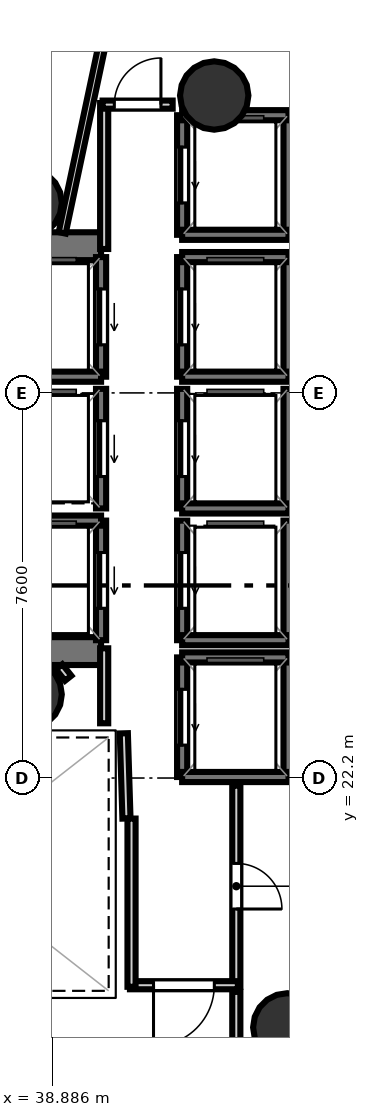
"""IFC4 building model, lengths in metres.
Left out: names, types, materials, properties, quantities, classifications, styles, units other than length and angle.
Written with IfcOpenShell. Run it as: python <this file> out.ifc"""

import sys

from ifc_helpers import new_model, si_unit, direction, frame, frame_2d, origin, origin_2d, place, context, subcontext, project, spatial, rectangle, hollow_circle, extrude, element, fill, save


model = new_model("IFC4")
c1 = context("Model", 3, precision=1e-05, world=origin(), true_north=direction((0.0, 1.0)))
c2 = subcontext(c1, "Body", "Model", "MODEL_VIEW")
j1 = project(units=[si_unit("LENGTHUNIT", "METRE"), si_unit("PLANEANGLEUNIT", "RADIAN")], contexts=[c1])
p1 = place(None, origin())
s1 = spatial("IfcSite", under=j1, at=p1, CompositionType="ELEMENT")
p2 = place(p1, origin())
s2 = spatial("IfcBuilding", under=s1, at=p2, CompositionType="ELEMENT")
p3 = place(p2, frame((0.0, 0.0, 143.1)))
s3 = spatial("IfcBuildingStorey", under=s2, at=p3, CompositionType="ELEMENT", Elevation=143.1)
p4 = place(p3, frame((29.23, 32.695, 0.0), z_axis=(0.0, 0.0, 1.0), x_axis=(1.0, 0.0, 0.0)))
e1 = element("IfcWall", 1, at=p4, inside=s3, PredefinedType="SHEAR", context=c2, shape_type="SweptSolid", body=[
    extrude(rectangle(XDim=10.62, YDim=0.55, at=frame_2d((5.31, 0.0))), origin(), (0.0, 0.0, 1.0), 4.32),
])
p5 = place(p4, frame((0.995, 0.0, 0.0)))
e2 = element("IfcOpeningElement", 2, at=p5, cuts=e1, PredefinedType="OPENING", context=c2, shape_type="SweptSolid", body=[
    extrude(rectangle(XDim=1.25, YDim=2.15, at=frame_2d((0.625, 1.075))), frame((0.0, 0.285, 0.0), z_axis=(0.0, -1.0, 0.0), x_axis=(1.0, 0.0, 0.0)), (0.0, 0.0, 1.0), 0.57),
])
p6 = place(p3, frame((29.23, 24.705, 0.0), z_axis=(0.0, 0.0, 1.0), x_axis=(1.0, 0.0, 0.0)))
e3 = element("IfcWall", 3, at=p6, inside=s3, PredefinedType="SHEAR", context=c2, shape_type="SweptSolid", body=[
    extrude(rectangle(XDim=10.62, YDim=0.55, at=frame_2d((5.31, 0.0))), origin(), (0.0, 0.0, 1.0), 4.32),
])
p7 = place(p6, frame((0.795, 0.0, 0.0)))
e4 = element("IfcOpeningElement", 4, at=p7, cuts=e3, PredefinedType="OPENING", context=c2, shape_type="SweptSolid", body=[
    extrude(rectangle(XDim=1.25, YDim=2.15, at=frame_2d((0.625, 1.075))), frame((0.0, 0.285, 0.0), z_axis=(0.0, -1.0, 0.0), x_axis=(1.0, 0.0, 0.0)), (0.0, 0.0, 1.0), 0.57),
])
for number, where, z_axis, x_axis in (
    (5, (38.4, 33.55, 0.0), (0.0, 0.0, 1.0), (1.0, 0.0, 0.0)),
    (6, (38.4, 23.85, 0.0), (0.0, 0.0, 1.0), (1.0, 0.0, 0.0)),
):
    element("IfcColumn", number, at=place(p3, frame(where, z_axis=z_axis, x_axis=x_axis)), inside=s3, PredefinedType="COLUMN", context=c2, shape_type="SweptSolid", body=[
        extrude(hollow_circle(Radius=0.675, WallThickness=0.032, at=origin_2d()), origin(), (0.0, 0.0, 1.0), 4.5),
    ])
for number, where, z_axis, x_axis in (
    (7, (42.083, 35.669, -0.27), (0.0, 0.0, 1.0), (1.0, 0.0, 0.0)),
    (8, (43.525, 17.279, -0.27), (0.0, 0.0, 1.0), (1.0, 0.0, 0.0)),
):
    element("IfcColumn", number, at=place(p3, frame(where, z_axis=z_axis, x_axis=x_axis)), inside=s3, PredefinedType="COLUMN", context=c2, shape_type="SweptSolid", body=[
        extrude(hollow_circle(Radius=0.675, WallThickness=0.032, at=origin_2d()), origin(), (0.0, 0.0, 1.0), 4.77),
    ])
p8 = place(p3, frame((39.85, 30.12, 0.0), z_axis=(0.0, 0.0, 1.0), x_axis=(0.0, 1.0, 0.0)))
e9 = element("IfcWall", 9, at=p8, inside=s3, PredefinedType="SOLIDWALL", context=c2, shape_type="SweptSolid", body=[
    extrude(rectangle(XDim=2.36, YDim=0.2, at=frame_2d((1.18, 0.0))), origin(), (0.0, 0.0, 1.0), 4.32),
])
p9 = place(p8, frame((0.63, 0.0, 0.0)))
e10 = element("IfcOpeningElement", 10, at=p9, cuts=e9, PredefinedType="OPENING", context=c2, shape_type="SweptSolid", body=[
    extrude(rectangle(XDim=1.1, YDim=2.15, at=frame_2d((0.55, 1.075))), frame((0.0, 0.11, 0.0), z_axis=(0.0, -1.0, 0.0), x_axis=(1.0, 0.0, 0.0)), (0.0, 0.0, 1.0), 0.22),
])
p10 = place(p3, frame((37.75, 30.12, 0.0), z_axis=(0.0, 0.0, 1.0), x_axis=(1.0, 0.0, 0.0)))
e11 = element("IfcWall", 11, at=p10, inside=s3, PredefinedType="SOLIDWALL", context=c2, shape_type="SweptSolid", body=[
    extrude(rectangle(XDim=2.1, YDim=0.2, at=frame_2d((1.05, 0.0))), origin(), (0.0, 0.0, 1.0), 4.32),
])
p11 = place(p3, frame((39.85, 24.92, 0.0), z_axis=(0.0, 0.0, 1.0), x_axis=(0.0, 1.0, 0.0)))
e12 = element("IfcWall", 12, at=p11, inside=s3, PredefinedType="SOLIDWALL", context=c2, shape_type="SweptSolid", body=[
    extrude(rectangle(XDim=2.36, YDim=0.2, at=frame_2d((1.18, 0.0))), origin(), (0.0, 0.0, 1.0), 4.32),
])
p12 = place(p11, frame((0.63, 0.0, 0.0)))
e13 = element("IfcOpeningElement", 13, at=p12, cuts=e12, PredefinedType="OPENING", context=c2, shape_type="SweptSolid", body=[
    extrude(rectangle(XDim=1.1, YDim=2.15, at=frame_2d((0.55, 1.075))), frame((0.0, 0.11, 0.0), z_axis=(0.0, -1.0, 0.0), x_axis=(1.0, 0.0, 0.0)), (0.0, 0.0, 1.0), 0.22),
])
p13 = place(p3, frame((37.75, 27.28, 0.0), z_axis=(0.0, 0.0, 1.0), x_axis=(1.0, 0.0, 0.0)))
e14 = element("IfcWall", 14, at=p13, inside=s3, PredefinedType="SOLIDWALL", context=c2, shape_type="SweptSolid", body=[
    extrude(rectangle(XDim=2.1, YDim=0.2, at=frame_2d((1.05, 0.0))), origin(), (0.0, 0.0, 1.0), 4.32),
])
p14 = place(p3, frame((43.55, 30.12, 0.0), z_axis=(0.0, 0.0, 1.0), x_axis=(0.0, 1.0, 0.0)))
e15 = element("IfcWall", 15, at=p14, inside=s3, PredefinedType="SOLIDWALL", context=c2, shape_type="SweptSolid", body=[
    extrude(rectangle(XDim=2.36, YDim=0.2, at=frame_2d((1.18, 0.0))), origin(), (0.0, 0.0, 1.0), 4.32),
])
p15 = place(p3, frame((41.45, 30.12, 0.0), z_axis=(0.0, 0.0, 1.0), x_axis=(0.0, 1.0, 0.0)))
e16 = element("IfcWall", 16, at=p15, inside=s3, PredefinedType="SOLIDWALL", context=c2, shape_type="SweptSolid", body=[
    extrude(rectangle(XDim=2.36, YDim=0.2, at=frame_2d((1.18, 0.0))), origin(), (0.0, 0.0, 1.0), 4.32),
])
p16 = place(p15, frame((0.63, 0.0, 0.0)))
e17 = element("IfcOpeningElement", 17, at=p16, cuts=e16, PredefinedType="OPENING", context=c2, shape_type="SweptSolid", body=[
    extrude(rectangle(XDim=1.1, YDim=2.15, at=frame_2d((0.55, 1.075))), frame((0.0, 0.11, 0.0), z_axis=(0.0, -1.0, 0.0), x_axis=(1.0, 0.0, 0.0)), (0.0, 0.0, 1.0), 0.22),
])
for number, where, z_axis, x_axis in (
    (18, (41.45, 32.48, 0.0), (0.0, 0.0, 1.0), (1.0, 0.0, 0.0)),
    (19, (41.45, 30.12, 0.0), (0.0, 0.0, 1.0), (1.0, 0.0, 0.0)),
):
    element("IfcWall", number, at=place(p3, frame(where, z_axis=z_axis, x_axis=x_axis)), inside=s3, PredefinedType="SOLIDWALL", context=c2, shape_type="SweptSolid", body=[
        extrude(rectangle(XDim=2.1, YDim=0.2, at=frame_2d((1.05, 0.0))), origin(), (0.0, 0.0, 1.0), 4.32),
    ])
p17 = place(p3, frame((43.55, 27.52, 0.0), z_axis=(0.0, 0.0, 1.0), x_axis=(0.0, 1.0, 0.0)))
e20 = element("IfcWall", 20, at=p17, inside=s3, PredefinedType="SOLIDWALL", context=c2, shape_type="SweptSolid", body=[
    extrude(rectangle(XDim=2.36, YDim=0.2, at=frame_2d((1.18, 0.0))), origin(), (0.0, 0.0, 1.0), 4.32),
])
p18 = place(p3, frame((41.45, 27.52, 0.0), z_axis=(0.0, 0.0, 1.0), x_axis=(0.0, 1.0, 0.0)))
e21 = element("IfcWall", 21, at=p18, inside=s3, PredefinedType="SOLIDWALL", context=c2, shape_type="SweptSolid", body=[
    extrude(rectangle(XDim=2.36, YDim=0.2, at=frame_2d((1.18, 0.0))), origin(), (0.0, 0.0, 1.0), 4.32),
])
p19 = place(p18, frame((0.63, 0.0, 0.0)))
e22 = element("IfcOpeningElement", 22, at=p19, cuts=e21, PredefinedType="OPENING", context=c2, shape_type="SweptSolid", body=[
    extrude(rectangle(XDim=1.1, YDim=2.15, at=frame_2d((0.55, 1.075))), frame((0.0, 0.11, 0.0), z_axis=(0.0, -1.0, 0.0), x_axis=(1.0, 0.0, 0.0)), (0.0, 0.0, 1.0), 0.22),
])
p20 = place(p3, frame((41.45, 27.52, 0.0), z_axis=(0.0, 0.0, 1.0), x_axis=(1.0, 0.0, 0.0)))
e23 = element("IfcWall", 23, at=p20, inside=s3, PredefinedType="SOLIDWALL", context=c2, shape_type="SweptSolid", body=[
    extrude(rectangle(XDim=2.1, YDim=0.2, at=frame_2d((1.05, 0.0))), origin(), (0.0, 0.0, 1.0), 4.32),
])
p21 = place(p3, frame((43.55, 24.92, 0.0), z_axis=(0.0, 0.0, 1.0), x_axis=(0.0, 1.0, 0.0)))
e24 = element("IfcWall", 24, at=p21, inside=s3, PredefinedType="SOLIDWALL", context=c2, shape_type="SweptSolid", body=[
    extrude(rectangle(XDim=2.36, YDim=0.2, at=frame_2d((1.18, 0.0))), origin(), (0.0, 0.0, 1.0), 4.32),
])
p22 = place(p3, frame((41.45, 24.92, 0.0), z_axis=(0.0, 0.0, 1.0), x_axis=(0.0, 1.0, 0.0)))
e25 = element("IfcWall", 25, at=p22, inside=s3, PredefinedType="SOLIDWALL", context=c2, shape_type="SweptSolid", body=[
    extrude(rectangle(XDim=2.36, YDim=0.2, at=frame_2d((1.18, 0.0))), origin(), (0.0, 0.0, 1.0), 4.32),
])
p23 = place(p22, frame((0.63, 0.0, 0.0)))
e26 = element("IfcOpeningElement", 26, at=p23, cuts=e25, PredefinedType="OPENING", context=c2, shape_type="SweptSolid", body=[
    extrude(rectangle(XDim=1.1, YDim=2.15, at=frame_2d((0.55, 1.075))), frame((0.0, 0.11, 0.0), z_axis=(0.0, -1.0, 0.0), x_axis=(1.0, 0.0, 0.0)), (0.0, 0.0, 1.0), 0.22),
])
p24 = place(p3, frame((41.45, 24.92, 0.0), z_axis=(0.0, 0.0, 1.0), x_axis=(1.0, 0.0, 0.0)))
e27 = element("IfcWall", 27, at=p24, inside=s3, PredefinedType="SOLIDWALL", context=c2, shape_type="SweptSolid", body=[
    extrude(rectangle(XDim=2.1, YDim=0.2, at=frame_2d((1.05, 0.0))), origin(), (0.0, 0.0, 1.0), 4.32),
])
p25 = place(p3, frame((39.85, 27.52, 0.0), z_axis=(0.0, 0.0, 1.0), x_axis=(0.0, 1.0, 0.0)))
e28 = element("IfcWall", 28, at=p25, inside=s3, PredefinedType="SOLIDWALL", context=c2, shape_type="SweptSolid", body=[
    extrude(rectangle(XDim=2.36, YDim=0.2, at=frame_2d((1.18, 0.0))), origin(), (0.0, 0.0, 1.0), 4.32),
])
p26 = place(p25, frame((0.63, 0.0, 0.0)))
e29 = element("IfcOpeningElement", 29, at=p26, cuts=e28, PredefinedType="OPENING", context=c2, shape_type="SweptSolid", body=[
    extrude(rectangle(XDim=1.1, YDim=2.15, at=frame_2d((0.55, 1.075))), frame((0.0, 0.11, 0.0), z_axis=(0.0, -1.0, 0.0), x_axis=(1.0, 0.0, 0.0)), (0.0, 0.0, 1.0), 0.22),
])
p27 = place(p3, frame((43.55, 22.22, 0.0), z_axis=(0.0, 0.0, 1.0), x_axis=(0.0, 1.0, 0.0)))
e30 = element("IfcWall", 30, at=p27, inside=s3, PredefinedType="SOLIDWALL", context=c2, shape_type="SweptSolid", body=[
    extrude(rectangle(XDim=2.36, YDim=0.2, at=frame_2d((1.18, 0.0))), origin(), (0.0, 0.0, 1.0), 4.32),
])
p28 = place(p3, frame((41.45, 22.22, 0.0), z_axis=(0.0, 0.0, 1.0), x_axis=(0.0, 1.0, 0.0)))
e31 = element("IfcWall", 31, at=p28, inside=s3, PredefinedType="SOLIDWALL", context=c2, shape_type="SweptSolid", body=[
    extrude(rectangle(XDim=2.36, YDim=0.2, at=frame_2d((1.18, 0.0))), origin(), (0.0, 0.0, 1.0), 4.32),
])
p29 = place(p28, frame((0.63, 0.0, 0.0)))
e32 = element("IfcOpeningElement", 32, at=p29, cuts=e31, PredefinedType="OPENING", context=c2, shape_type="SweptSolid", body=[
    extrude(rectangle(XDim=1.1, YDim=2.15, at=frame_2d((0.55, 1.075))), frame((0.0, 0.11, 0.0), z_axis=(0.0, -1.0, 0.0), x_axis=(1.0, 0.0, 0.0)), (0.0, 0.0, 1.0), 0.22),
])
for number, where, z_axis, x_axis in (
    (33, (41.45, 24.58, 0.0), (0.0, 0.0, 1.0), (1.0, 0.0, 0.0)),
    (34, (41.45, 22.22, 0.0), (0.0, 0.0, 1.0), (1.0, 0.0, 0.0)),
):
    element("IfcWall", number, at=place(p3, frame(where, z_axis=z_axis, x_axis=x_axis)), inside=s3, PredefinedType="SOLIDWALL", context=c2, shape_type="SweptSolid", body=[
        extrude(rectangle(XDim=2.1, YDim=0.2, at=frame_2d((1.05, 0.0))), origin(), (0.0, 0.0, 1.0), 4.32),
    ])
p30 = place(p3, frame((43.55, 32.92, 0.0), z_axis=(0.0, 0.0, 1.0), x_axis=(0.0, 1.0, 0.0)))
e35 = element("IfcWall", 35, at=p30, inside=s3, PredefinedType="SOLIDWALL", context=c2, shape_type="SweptSolid", body=[
    extrude(rectangle(XDim=2.36, YDim=0.2, at=frame_2d((1.18, 0.0))), origin(), (0.0, 0.0, 1.0), 4.32),
])
p31 = place(p3, frame((41.45, 32.92, 0.0), z_axis=(0.0, 0.0, 1.0), x_axis=(0.0, 1.0, 0.0)))
e36 = element("IfcWall", 36, at=p31, inside=s3, PredefinedType="SOLIDWALL", context=c2, shape_type="SweptSolid", body=[
    extrude(rectangle(XDim=2.36, YDim=0.2, at=frame_2d((1.18, 0.0))), origin(), (0.0, 0.0, 1.0), 4.32),
])
p32 = place(p31, frame((0.63, 0.0, 0.0)))
e37 = element("IfcOpeningElement", 37, at=p32, cuts=e36, PredefinedType="OPENING", context=c2, shape_type="SweptSolid", body=[
    extrude(rectangle(XDim=1.1, YDim=2.15, at=frame_2d((0.55, 1.075))), frame((0.0, 0.11, 0.0), z_axis=(0.0, -1.0, 0.0), x_axis=(1.0, 0.0, 0.0)), (0.0, 0.0, 1.0), 0.22),
])
for number, where, z_axis, x_axis in (
    (38, (41.45, 35.28, 0.0), (0.0, 0.0, 1.0), (1.0, 0.0, 0.0)),
    (39, (41.45, 32.92, 0.0), (0.0, 0.0, 1.0), (1.0, 0.0, 0.0)),
):
    element("IfcWall", number, at=place(p3, frame(where, z_axis=z_axis, x_axis=x_axis)), inside=s3, PredefinedType="SOLIDWALL", context=c2, shape_type="SweptSolid", body=[
        extrude(rectangle(XDim=2.1, YDim=0.2, at=frame_2d((1.05, 0.0))), origin(), (0.0, 0.0, 1.0), 4.32),
    ])
p33 = place(p3, frame((40.351, 21.401, 0.0), z_axis=(0.0, 0.0, 1.0), x_axis=(-0.031058045979, 0.999517582527, 0.0)))
e40 = element("IfcWall", 40, at=p33, inside=s3, PredefinedType="PARTITIONING", context=c2, shape_type="SweptSolid", body=[
    extrude(rectangle(XDim=1.682, YDim=0.16, at=frame_2d((0.841, 0.0))), origin(), (0.0, 0.0, 1.0), 3.64),
])
p34 = place(p3, frame((39.911, 23.28, 0.0), z_axis=(0.0, 0.0, 1.0), x_axis=(0.0, 1.0, 0.0)))
e41 = element("IfcWall", 41, at=p34, inside=s3, PredefinedType="PARTITIONING", context=c2, shape_type="SweptSolid", body=[
    extrude(rectangle(XDim=1.48, YDim=0.16, at=frame_2d((0.74, 0.0))), origin(), (0.0, 0.0, 1.0), 3.64),
])
p35 = place(p3, frame((39.911, 32.64, 0.0), z_axis=(0.0, 0.0, 1.0), x_axis=(0.0, 1.0, 0.0)))
e42 = element("IfcWall", 42, at=p35, inside=s3, PredefinedType="PARTITIONING", context=c2, shape_type="SweptSolid", body=[
    extrude(rectangle(XDim=2.88, YDim=0.16, at=frame_2d((1.44, 0.0))), origin(), (0.0, 0.0, 1.0), 3.64),
])
p36 = place(p3, frame((39.88, 35.489, 0.0), z_axis=(0.0, 0.0, 1.0), x_axis=(1.0, 0.0, 0.0)))
e43 = element("IfcWall", 43, at=p36, inside=s3, PredefinedType="PARTITIONING", context=c2, shape_type="SweptSolid", body=[
    extrude(rectangle(XDim=1.383, YDim=0.16, at=frame_2d((0.691, 0.0))), origin(), (0.0, 0.0, 1.0), 3.64),
])
p37 = place(p36, frame((0.231, 0.0, 0.0)))
e44 = element("IfcOpeningElement", 44, at=p37, cuts=e43, PredefinedType="OPENING", context=c2, shape_type="SweptSolid", body=[
    extrude(rectangle(XDim=0.92, YDim=2.1, at=frame_2d((0.46, 1.05))), frame((0.0, 0.09, 0.0), z_axis=(0.0, -1.0, 0.0), x_axis=(1.0, 0.0, 0.0)), (0.0, 0.0, 1.0), 0.18),
])
p38 = place(p3, frame((42.519, 22.05, 0.0), z_axis=(0.0, 0.0, 1.0), x_axis=(0.0, -1.0, 0.0)))
e45 = element("IfcWall", 45, at=p38, inside=s3, PredefinedType="PARTITIONING", context=c2, shape_type="SweptSolid", body=[
    extrude(rectangle(XDim=3.97, YDim=0.16, at=frame_2d((1.985, 0.0))), origin(), (0.0, 0.0, 1.0), 3.64),
])
p39 = place(p38, frame((1.535, 0.0, 0.0)))
e46 = element("IfcOpeningElement", 46, at=p39, cuts=e45, PredefinedType="OPENING", context=c2, shape_type="SweptSolid", body=[
    extrude(rectangle(XDim=0.9, YDim=2.1, at=frame_2d((0.45, 1.05))), frame((0.0, 0.09, 0.0), z_axis=(0.0, -1.0, 0.0), x_axis=(1.0, 0.0, 0.0)), (0.0, 0.0, 1.0), 0.18),
])
p40 = place(p3, frame((42.55, 18.111, 0.0), z_axis=(0.0, 0.0, 1.0), x_axis=(-1.0, 0.0, 0.0)))
e47 = element("IfcWall", 47, at=p40, inside=s3, PredefinedType="PARTITIONING", context=c2, shape_type="SweptSolid", body=[
    extrude(rectangle(XDim=2.13, YDim=0.16, at=frame_2d((1.065, 0.0))), origin(), (0.0, 0.0, 1.0), 3.64),
])
p41 = place(p40, frame((0.465, 0.0, 0.0)))
e48 = element("IfcOpeningElement", 48, at=p41, cuts=e47, PredefinedType="OPENING", context=c2, shape_type="SweptSolid", body=[
    extrude(rectangle(XDim=1.2, YDim=2.15, at=frame_2d((0.6, 1.075))), frame((0.0, 0.09, 0.0), z_axis=(0.0, -1.0, 0.0), x_axis=(1.0, 0.0, 0.0)), (0.0, 0.0, 1.0), 0.18),
])
p42 = place(p3, frame((40.451, 18.08, 0.0), z_axis=(0.0, 0.0, 1.0), x_axis=(0.0, 1.0, 0.0)))
e49 = element("IfcWall", 49, at=p42, inside=s3, PredefinedType="PARTITIONING", context=c2, shape_type="SweptSolid", body=[
    extrude(rectangle(XDim=3.32, YDim=0.16, at=frame_2d((1.66, 0.0))), origin(), (0.0, 0.0, 1.0), 3.64),
])
p43 = place(p3, frame((39.202, 24.169, 0.0), z_axis=(0.0, 0.0, 1.0), x_axis=(-0.621699046284, 0.783256213413, 0.0)))
e50 = element("IfcWall", 50, at=p43, inside=s3, PredefinedType="PARTITIONING", context=c2, shape_type="SweptSolid", body=[
    extrude(rectangle(XDim=0.289, YDim=0.16, at=frame_2d((0.144, 0.0))), origin(), (0.0, 0.0, 1.0), 3.64),
])
p44 = place(p3, frame((42.519, 17.98, 0.0), z_axis=(0.0, 0.0, 1.0), x_axis=(0.0, -1.0, 0.0)))
e51 = element("IfcWall", 51, at=p44, inside=s3, PredefinedType="PARTITIONING", context=c2, shape_type="SweptSolid", body=[
    extrude(rectangle(XDim=3.335, YDim=0.16, at=frame_2d((1.668, 0.0))), origin(), (0.0, 0.0, 1.0), 3.64),
])
p45 = place(p3, frame((39.082, 32.958, 0.0), z_axis=(0.0, 0.0, 1.0), x_axis=(0.207932173696, 0.978143246739, 0.0)))
e52 = element("IfcWall", 52, at=p45, inside=s3, PredefinedType="PARTITIONING", context=c2, shape_type="SweptSolid", body=[
    extrude(rectangle(XDim=5.608, YDim=0.14, at=frame_2d((2.804, 0.0))), origin(), (0.0, 0.0, 1.0), 3.64),
])
p46 = place(p9, origin())
e53 = element("IfcDoor", 53, at=p46, inside=s3, OperationType="SLIDING_TO_LEFT", PredefinedType="DOOR", context=c2, shape_type="SweptSolid", body=[
    extrude(rectangle(XDim=1.1, YDim=2.15, at=frame_2d((0.55, 1.075))), frame((0.0, 0.025, 0.0), z_axis=(0.0, -1.0, 0.0), x_axis=(1.0, 0.0, 0.0)), (0.0, 0.0, 1.0), 0.05),
])
fill(e10, e53)
p47 = place(p12, origin())
e54 = element("IfcDoor", 54, at=p47, inside=s3, OperationType="SLIDING_TO_LEFT", PredefinedType="DOOR", context=c2, shape_type="SweptSolid", body=[
    extrude(rectangle(XDim=1.1, YDim=2.15, at=frame_2d((0.55, 1.075))), frame((0.0, 0.025, 0.0), z_axis=(0.0, -1.0, 0.0), x_axis=(1.0, 0.0, 0.0)), (0.0, 0.0, 1.0), 0.05),
])
fill(e13, e54)
p48 = place(p16, origin())
e55 = element("IfcDoor", 55, at=p48, inside=s3, OperationType="SLIDING_TO_LEFT", PredefinedType="DOOR", context=c2, shape_type="SweptSolid", body=[
    extrude(rectangle(XDim=1.1, YDim=2.15, at=frame_2d((0.55, 1.075))), frame((0.0, 0.025, 0.0), z_axis=(0.0, -1.0, 0.0), x_axis=(1.0, 0.0, 0.0)), (0.0, 0.0, 1.0), 0.05),
])
fill(e17, e55)
p49 = place(p19, origin())
e56 = element("IfcDoor", 56, at=p49, inside=s3, OperationType="SLIDING_TO_LEFT", PredefinedType="DOOR", context=c2, shape_type="SweptSolid", body=[
    extrude(rectangle(XDim=1.1, YDim=2.15, at=frame_2d((0.55, 1.075))), frame((0.0, 0.025, 0.0), z_axis=(0.0, -1.0, 0.0), x_axis=(1.0, 0.0, 0.0)), (0.0, 0.0, 1.0), 0.05),
])
fill(e22, e56)
p50 = place(p23, origin())
e57 = element("IfcDoor", 57, at=p50, inside=s3, OperationType="SLIDING_TO_LEFT", PredefinedType="DOOR", context=c2, shape_type="SweptSolid", body=[
    extrude(rectangle(XDim=1.1, YDim=2.15, at=frame_2d((0.55, 1.075))), frame((0.0, 0.025, 0.0), z_axis=(0.0, -1.0, 0.0), x_axis=(1.0, 0.0, 0.0)), (0.0, 0.0, 1.0), 0.05),
])
fill(e26, e57)
p51 = place(p26, origin())
e58 = element("IfcDoor", 58, at=p51, inside=s3, OperationType="SLIDING_TO_LEFT", PredefinedType="DOOR", context=c2, shape_type="SweptSolid", body=[
    extrude(rectangle(XDim=1.1, YDim=2.15, at=frame_2d((0.55, 1.075))), frame((0.0, 0.025, 0.0), z_axis=(0.0, -1.0, 0.0), x_axis=(1.0, 0.0, 0.0)), (0.0, 0.0, 1.0), 0.05),
])
fill(e29, e58)
p52 = place(p29, origin())
e59 = element("IfcDoor", 59, at=p52, inside=s3, OperationType="SLIDING_TO_LEFT", PredefinedType="DOOR", context=c2, shape_type="SweptSolid", body=[
    extrude(rectangle(XDim=1.1, YDim=2.15, at=frame_2d((0.55, 1.075))), frame((0.0, 0.025, 0.0), z_axis=(0.0, -1.0, 0.0), x_axis=(1.0, 0.0, 0.0)), (0.0, 0.0, 1.0), 0.05),
])
fill(e32, e59)
p53 = place(p32, origin())
e60 = element("IfcDoor", 60, at=p53, inside=s3, OperationType="SLIDING_TO_LEFT", PredefinedType="DOOR", context=c2, shape_type="SweptSolid", body=[
    extrude(rectangle(XDim=1.1, YDim=2.15, at=frame_2d((0.55, 1.075))), frame((0.0, 0.025, 0.0), z_axis=(0.0, -1.0, 0.0), x_axis=(1.0, 0.0, 0.0)), (0.0, 0.0, 1.0), 0.05),
])
fill(e37, e60)
p54 = place(p41, origin())
e61 = element("IfcDoor", 61, at=p54, inside=s3, OperationType="SINGLE_SWING_RIGHT", PredefinedType="DOOR", context=c2, shape_type="SweptSolid", body=[
    extrude(rectangle(XDim=1.2, YDim=2.15, at=frame_2d((0.6, 1.075))), frame((0.0, 0.025, 0.0), z_axis=(0.0, -1.0, 0.0), x_axis=(1.0, 0.0, 0.0)), (0.0, 0.0, 1.0), 0.05),
])
fill(e48, e61)
p55 = place(p39, origin())
e62 = element("IfcDoor", 62, at=p55, inside=s3, OperationType="SINGLE_SWING_RIGHT", PredefinedType="DOOR", context=c2, shape_type="SweptSolid", body=[
    extrude(rectangle(XDim=0.9, YDim=2.1, at=frame_2d((0.45, 1.05))), frame((0.0, 0.025, 0.0), z_axis=(0.0, -1.0, 0.0), x_axis=(1.0, 0.0, 0.0)), (0.0, 0.0, 1.0), 0.05),
])
fill(e46, e62)
p56 = place(p37, origin())
e63 = element("IfcDoor", 63, at=p56, inside=s3, OperationType="SINGLE_SWING_RIGHT", PredefinedType="DOOR", context=c2, shape_type="SweptSolid", body=[
    extrude(rectangle(XDim=0.92, YDim=2.1, at=frame_2d((0.46, 1.05))), frame((0.0, 0.025, 0.0), z_axis=(0.0, -1.0, 0.0), x_axis=(1.0, 0.0, 0.0)), (0.0, 0.0, 1.0), 0.05),
])
fill(e44, e63)
save(model, sys.argv[1])
